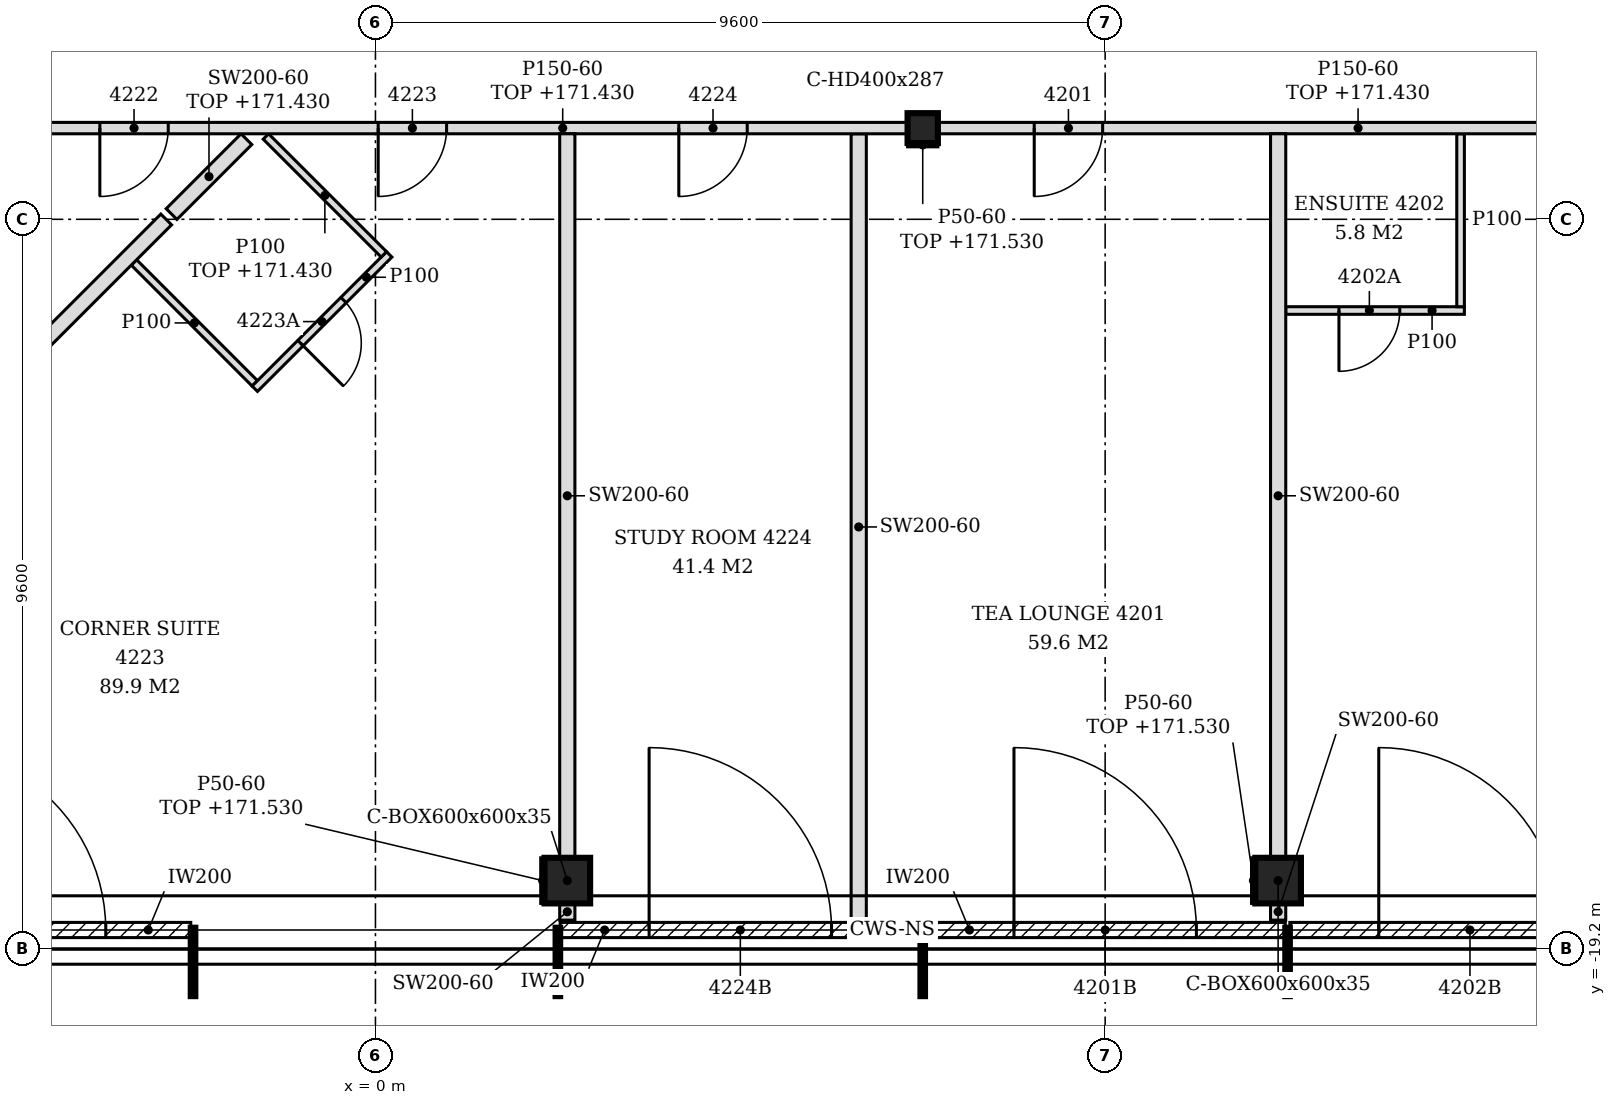
"""IFC4 building model, lengths in metres.
Left out: names, types, materials, properties, quantities, classifications, styles, units other than length and angle.
Written with IfcOpenShell. Run it as: python <this file> out.ifc"""

import sys

from ifc_helpers import new_model, si_unit, direction, frame, frame_2d, origin, origin_2d, place, context, subcontext, project, spatial, polyline, rectangle, hollow_rectangle, i_section, outline, extrude, clip, halfspace, element, fill, save


model = new_model("IFC4")
c1 = context("Model", 3, precision=1e-05, world=origin(), true_north=direction((0.0, 1.0)))
c2 = subcontext(c1, "Body", "Model", "MODEL_VIEW")
j1 = project(units=[si_unit("LENGTHUNIT", "METRE"), si_unit("PLANEANGLEUNIT", "RADIAN")], contexts=[c1])
p1 = place(None, origin())
s1 = spatial("IfcSite", under=j1, at=p1, CompositionType="ELEMENT")
p2 = place(p1, origin())
s2 = spatial("IfcBuilding", under=s1, at=p2, CompositionType="ELEMENT")
p3 = place(p2, frame((0.0, 0.0, 168.6)))
s3 = spatial("IfcBuildingStorey", under=s2, at=p3, CompositionType="ELEMENT", Elevation=168.6)
for number, where, z_axis, x_axis in (
    (1, (2.524, -18.3, -0.15), (0.0, 0.0, 1.0), (1.0, 0.0, 0.0)),
    (2, (11.876, -18.3, -0.15), (0.0, 0.0, 1.0), (1.0, 0.0, 0.0)),
):
    element("IfcColumn", number, at=place(p3, frame(where, z_axis=z_axis, x_axis=x_axis)), inside=s3, PredefinedType="COLUMN", context=c2, shape_type="Clipping", body=[
        clip(extrude(hollow_rectangle(XDim=0.6, YDim=0.6, WallThickness=0.035, at=origin_2d()), origin(), (0.0, 0.0, 1.0), 3.6), halfspace(frame((0.0, 0.0, 3.589), z_axis=(0.0, 0.0, 1.0), x_axis=(1.0, 0.0, 0.0)), False)),
    ])
p4 = place(p3, frame((7.2, -8.4, -0.15), z_axis=(0.0, 0.0, 1.0), x_axis=(1.0, 0.0, 0.0)))
e3 = element("IfcColumn", 3, at=p4, inside=s3, PredefinedType="COLUMN", context=c2, shape_type="SweptSolid", body=[
    extrude(i_section(OverallWidth=0.399, OverallDepth=0.393, WebThickness=0.023, FlangeThickness=0.037, FilletRadius=0.015, at=origin_2d()), origin(), (0.0, 0.0, 1.0), 3.6),
])
p5 = place(p3, frame((-7.056, -18.95, 0.0), z_axis=(0.0, 0.0, 1.0), x_axis=(1.0, 0.0, 0.0)))
e4 = element("IfcWall", 4, at=p5, inside=s3, PredefinedType="NOTDEFINED", context=c2, shape_type="SweptSolid", body=[
    extrude(rectangle(XDim=4.626, YDim=0.2, at=frame_2d((2.313, 0.0))), origin(), (0.0, 0.0, 1.0), 3.45),
])
p6 = place(p5, frame((1.108, 0.0, 0.0)))
e5 = element("IfcOpeningElement", 5, at=p6, cuts=e4, PredefinedType="OPENING", context=c2, shape_type="SweptSolid", body=[
    extrude(rectangle(XDim=2.4, YDim=2.4, at=frame_2d((1.2, 1.2))), frame((0.0, 0.11, 0.0), z_axis=(0.0, -1.0, 0.0), x_axis=(1.0, 0.0, 0.0)), (0.0, 0.0, 1.0), 0.22),
])
p7 = place(p3, frame((2.43, -18.95, 0.0), z_axis=(0.0, 0.0, 1.0), x_axis=(1.0, 0.0, 0.0)))
e6 = element("IfcWall", 6, at=p7, inside=s3, PredefinedType="NOTDEFINED", context=c2, shape_type="SweptSolid", body=[
    extrude(rectangle(XDim=4.74, YDim=0.2, at=frame_2d((2.37, 0.0))), origin(), (0.0, 0.0, 1.0), 3.45),
])
p8 = place(p7, frame((1.17, 0.0, 0.0)))
e7 = element("IfcOpeningElement", 7, at=p8, cuts=e6, PredefinedType="OPENING", context=c2, shape_type="SweptSolid", body=[
    extrude(rectangle(XDim=2.4, YDim=2.4, at=frame_2d((1.2, 1.2))), frame((0.0, 0.11, 0.0), z_axis=(0.0, -1.0, 0.0), x_axis=(1.0, 0.0, 0.0)), (0.0, 0.0, 1.0), 0.22),
])
p9 = place(p3, frame((7.23, -18.95, 0.0), z_axis=(0.0, 0.0, 1.0), x_axis=(1.0, 0.0, 0.0)))
e8 = element("IfcWall", 8, at=p9, inside=s3, PredefinedType="NOTDEFINED", context=c2, shape_type="SweptSolid", body=[
    extrude(rectangle(XDim=4.74, YDim=0.2, at=frame_2d((2.37, 0.0))), origin(), (0.0, 0.0, 1.0), 3.45),
])
p10 = place(p9, frame((1.17, 0.0, 0.0)))
e9 = element("IfcOpeningElement", 9, at=p10, cuts=e8, PredefinedType="OPENING", context=c2, shape_type="SweptSolid", body=[
    extrude(rectangle(XDim=2.4, YDim=2.4, at=frame_2d((1.2, 1.2))), frame((0.0, 0.11, 0.0), z_axis=(0.0, -1.0, 0.0), x_axis=(1.0, 0.0, 0.0)), (0.0, 0.0, 1.0), 0.22),
])
p11 = place(p3, frame((12.03, -18.95, 0.0), z_axis=(0.0, 0.0, 1.0), x_axis=(1.0, 0.0, 0.0)))
e10 = element("IfcWall", 10, at=p11, inside=s3, PredefinedType="NOTDEFINED", context=c2, shape_type="SweptSolid", body=[
    extrude(rectangle(XDim=4.74, YDim=0.2, at=frame_2d((2.37, 0.0))), origin(), (0.0, 0.0, 1.0), 3.45),
])
p12 = place(p11, frame((1.17, 0.0, 0.0)))
e11 = element("IfcOpeningElement", 11, at=p12, cuts=e10, PredefinedType="OPENING", context=c2, shape_type="SweptSolid", body=[
    extrude(rectangle(XDim=2.4, YDim=2.4, at=frame_2d((1.2, 1.2))), frame((0.0, 0.11, 0.0), z_axis=(0.0, -1.0, 0.0), x_axis=(1.0, 0.0, 0.0)), (0.0, 0.0, 1.0), 0.22),
])
p13 = place(p3, frame((2.524, -18.82, 0.0), z_axis=(0.0, 0.0, 1.0), x_axis=(0.0, 1.0, 0.0)))
e12 = element("IfcWall", 12, at=p13, inside=s3, PredefinedType="PARTITIONING", context=c2, shape_type="SweptSolid", body=[
    extrude(rectangle(XDim=0.22, YDim=0.2, at=frame_2d((0.11, 0.0))), origin(), (0.0, 0.0, 1.0), 3.45),
])
p14 = place(p3, frame((6.358, -18.82, 0.0), z_axis=(0.0, 0.0, 1.0), x_axis=(0.0, 1.0, 0.0)))
e13 = element("IfcWall", 13, at=p14, inside=s3, PredefinedType="PARTITIONING", context=c2, shape_type="SweptSolid", body=[
    extrude(outline(polyline([(0.0, 0.0), (10.345, 0.0), (10.345, 2.83), (10.27, 2.83), (10.268, 3.45), (4.525, 3.45), (4.523, 2.88), (4.315, 2.88), (4.313, 3.45), (0.67, 3.45), (0.668, 2.93), (0.37, 2.93), (0.368, 3.45), (0.0, 3.45), (0.0, 0.0)])), frame((0.0, 0.1, 0.0), z_axis=(0.0, -1.0, 0.0), x_axis=(1.0, 0.0, 0.0)), (0.0, 0.0, 1.0), 0.2),
])
p15 = place(p3, frame((11.876, -18.82, 0.0), z_axis=(0.0, 0.0, 1.0), x_axis=(0.0, 1.0, 0.0)))
e14 = element("IfcWall", 14, at=p15, inside=s3, PredefinedType="PARTITIONING", context=c2, shape_type="SweptSolid", body=[
    extrude(rectangle(XDim=0.22, YDim=0.2, at=frame_2d((0.11, 0.0))), origin(), (0.0, 0.0, 1.0), 3.45),
])
for number, where, z_axis, x_axis in (
    (15, (2.524, -18.0, 0.0), (0.0, 0.0, 1.0), (0.0, 1.0, 0.0)),
    (16, (11.876, -18.0, 0.0), (0.0, 0.0, 1.0), (0.0, 1.0, 0.0)),
):
    element("IfcWall", number, at=place(p3, frame(where, z_axis=z_axis, x_axis=x_axis)), inside=s3, PredefinedType="PARTITIONING", context=c2, shape_type="SweptSolid", body=[
        extrude(outline(polyline([(0.0, 0.0), (9.525, 0.0), (9.525, 2.83), (9.45, 2.83), (9.448, 3.45), (3.705, 3.45), (3.703, 2.88), (3.495, 2.88), (3.493, 3.45), (0.0, 3.45), (0.0, 0.0)])), frame((0.0, 0.1, 0.0), z_axis=(0.0, -1.0, 0.0), x_axis=(1.0, 0.0, 0.0)), (0.0, 0.0, 1.0), 0.2),
    ])
p16 = place(p3, frame((-9.507, -16.355, 0.0), z_axis=(0.0, 0.0, 1.0), x_axis=(0.707170680804, 0.707042875794, 0.0)))
e17 = element("IfcWall", 17, at=p16, inside=s3, PredefinedType="PARTITIONING", context=c2, shape_type="SweptSolid", body=[
    extrude(rectangle(XDim=9.551, YDim=0.2, at=frame_2d((4.776, 0.0))), origin(), (0.0, 0.0, 1.0), 2.93),
])
p17 = place(p3, frame((-1.587, -11.759, 0.0), z_axis=(0.0, 0.0, 1.0), x_axis=(-0.706889644159, 0.707323851557, 0.0)))
e18 = element("IfcWall", 18, at=p17, inside=s3, PredefinedType="PARTITIONING", context=c2, shape_type="SweptSolid", body=[
    extrude(rectangle(XDim=2.249, YDim=0.1, at=frame_2d((1.125, 0.0))), origin(), (0.0, 0.0, 1.0), 3.45),
])
p18 = place(p3, frame((-1.587, -11.829, 0.0), z_axis=(0.0, 0.0, 1.0), x_axis=(0.707350821469, 0.706862656651, 0.0)))
e19 = element("IfcWall", 19, at=p18, inside=s3, PredefinedType="PARTITIONING", context=c2, shape_type="SweptSolid", body=[
    extrude(rectangle(XDim=2.5, YDim=0.1, at=frame_2d((1.25, 0.0))), origin(), (0.0, 0.0, 1.0), 3.45),
])
p19 = place(p18, frame((0.85, 0.0, 0.0)))
e20 = element("IfcOpeningElement", 20, at=p19, cuts=e19, PredefinedType="OPENING", context=c2, shape_type="SweptSolid", body=[
    extrude(rectangle(XDim=0.8, YDim=2.1, at=frame_2d((0.4, 1.05))), frame((0.0, 0.06, 0.0), z_axis=(0.0, -1.0, 0.0), x_axis=(1.0, 0.0, 0.0)), (0.0, 0.0, 1.0), 0.12),
])
p20 = place(p3, frame((11.976, -10.8, 0.0), z_axis=(0.0, 0.0, 1.0), x_axis=(1.0, 0.0, 0.0)))
e21 = element("IfcWall", 21, at=p20, inside=s3, PredefinedType="PARTITIONING", context=c2, shape_type="SweptSolid", body=[
    extrude(rectangle(XDim=2.35, YDim=0.1, at=frame_2d((1.175, 0.0))), origin(), (0.0, 0.0, 1.0), 3.45),
])
p21 = place(p20, frame((0.7, 0.0, 0.0)))
e22 = element("IfcOpeningElement", 22, at=p21, cuts=e21, PredefinedType="OPENING", context=c2, shape_type="SweptSolid", body=[
    extrude(rectangle(XDim=0.8, YDim=2.1, at=frame_2d((0.4, 1.05))), frame((0.0, 0.06, 0.0), z_axis=(0.0, -1.0, 0.0), x_axis=(1.0, 0.0, 0.0)), (0.0, 0.0, 1.0), 0.12),
])
p22 = place(p3, frame((14.276, -10.75, 0.0), z_axis=(0.0, 0.0, 1.0), x_axis=(0.0, 1.0, 0.0)))
e23 = element("IfcWall", 23, at=p22, inside=s3, PredefinedType="PARTITIONING", context=c2, shape_type="SweptSolid", body=[
    extrude(outline(polyline([(0.0, 0.0), (2.275, 0.0), (2.275, 2.83), (2.2, 2.83), (2.198, 3.45), (0.0, 3.45), (0.0, 0.0)])), frame((0.0, 0.05, 0.0), z_axis=(0.0, -1.0, 0.0), x_axis=(1.0, 0.0, 0.0)), (0.0, 0.0, 1.0), 0.1),
])
p23 = place(p3, frame((0.111, -10.062, 0.0), z_axis=(0.0, 0.0, 1.0), x_axis=(-0.70732924673, 0.706884245631, 0.0)))
e24 = element("IfcWall", 24, at=p23, inside=s3, PredefinedType="PARTITIONING", context=c2, shape_type="SweptSolid", body=[
    extrude(rectangle(XDim=2.195, YDim=0.1, at=frame_2d((1.097, 0.0))), origin(), (0.0, 0.0, 1.0), 2.83),
])
p24 = place(p3, frame((-2.683, -9.531, 0.0), z_axis=(0.0, 0.0, 1.0), x_axis=(0.707019164958, 0.70719438656, 0.0)))
e25 = element("IfcWall", 25, at=p24, inside=s3, PredefinedType="PARTITIONING", context=c2, shape_type="SweptSolid", body=[
    extrude(rectangle(XDim=1.393, YDim=0.2, at=frame_2d((0.697, 0.0))), origin(), (0.0, 0.0, 1.0), 2.83),
])
p25 = place(p3, frame((-4.601, -8.4, 0.0), z_axis=(0.0, 0.0, 1.0), x_axis=(1.0, 0.0, 0.0)))
e26 = element("IfcWall", 26, at=p25, inside=s3, PredefinedType="PARTITIONING", context=c2, shape_type="SweptSolid", body=[
    extrude(rectangle(XDim=11.601, YDim=0.15, at=frame_2d((5.801, 0.0))), origin(), (0.0, 0.0, 1.0), 2.83),
])
p26 = place(p25, frame((0.974, 0.0, 0.0)))
e27 = element("IfcOpeningElement", 27, at=p26, cuts=e26, PredefinedType="OPENING", context=c2, shape_type="SweptSolid", body=[
    extrude(rectangle(XDim=0.9, YDim=2.1, at=frame_2d((0.45, 1.05))), frame((0.0, 0.085, 0.0), z_axis=(0.0, -1.0, 0.0), x_axis=(1.0, 0.0, 0.0)), (0.0, 0.0, 1.0), 0.17),
])
p27 = place(p25, frame((4.636, 0.0, 0.0)))
e28 = element("IfcOpeningElement", 28, at=p27, cuts=e26, PredefinedType="OPENING", context=c2, shape_type="SweptSolid", body=[
    extrude(rectangle(XDim=0.9, YDim=2.1, at=frame_2d((0.45, 1.05))), frame((0.0, 0.085, 0.0), z_axis=(0.0, -1.0, 0.0), x_axis=(1.0, 0.0, 0.0)), (0.0, 0.0, 1.0), 0.17),
])
p28 = place(p25, frame((8.592, 0.0, 0.0)))
e29 = element("IfcOpeningElement", 29, at=p28, cuts=e26, PredefinedType="OPENING", context=c2, shape_type="SweptSolid", body=[
    extrude(rectangle(XDim=0.9, YDim=2.1, at=frame_2d((0.45, 1.05))), frame((0.0, 0.085, 0.0), z_axis=(0.0, -1.0, 0.0), x_axis=(1.0, 0.0, 0.0)), (0.0, 0.0, 1.0), 0.17),
])
p29 = place(p3, frame((7.399, -8.4, 0.0), z_axis=(0.0, 0.0, 1.0), x_axis=(1.0, 0.0, 0.0)))
e30 = element("IfcWall", 30, at=p29, inside=s3, PredefinedType="PARTITIONING", context=c2, shape_type="SweptSolid", body=[
    extrude(rectangle(XDim=11.601, YDim=0.15, at=frame_2d((5.801, 0.0))), origin(), (0.0, 0.0, 1.0), 2.83),
])
p30 = place(p29, frame((1.268, 0.0, 0.0)))
e31 = element("IfcOpeningElement", 31, at=p30, cuts=e30, PredefinedType="OPENING", context=c2, shape_type="SweptSolid", body=[
    extrude(rectangle(XDim=0.9, YDim=2.1, at=frame_2d((0.45, 1.05))), frame((0.0, 0.085, 0.0), z_axis=(0.0, -1.0, 0.0), x_axis=(1.0, 0.0, 0.0)), (0.0, 0.0, 1.0), 0.17),
])
p31 = place(p29, frame((8.888, 0.0, 0.0)))
e32 = element("IfcOpeningElement", 32, at=p31, cuts=e30, PredefinedType="OPENING", context=c2, shape_type="SweptSolid", body=[
    extrude(rectangle(XDim=0.9, YDim=2.1, at=frame_2d((0.45, 1.05))), frame((0.0, 0.085, 0.0), z_axis=(0.0, -1.0, 0.0), x_axis=(1.0, 0.0, 0.0)), (0.0, 0.0, 1.0), 0.17),
])
for number, where, z_axis, x_axis in (
    (33, (2.199, -18.6, 0.0), (0.0, 0.0, 1.0), (0.0, 1.0, 0.0)),
    (34, (11.551, -18.6, 0.0), (0.0, 0.0, 1.0), (0.0, 1.0, 0.0)),
):
    element("IfcWall", number, at=place(p3, frame(where, z_axis=z_axis, x_axis=x_axis)), inside=s3, PredefinedType="PARTITIONING", context=c2, shape_type="SweptSolid", body=[
        extrude(rectangle(XDim=0.6, YDim=0.05, at=frame_2d((0.3, 0.0))), origin(), (0.0, 0.0, 1.0), 2.93),
    ])
p32 = place(p3, frame((7.0, -8.622, 0.0), z_axis=(0.0, 0.0, 1.0), x_axis=(1.0, 0.0, 0.0)))
e35 = element("IfcWall", 35, at=p32, inside=s3, PredefinedType="PARTITIONING", context=c2, shape_type="SweptSolid", body=[
    extrude(rectangle(XDim=0.399, YDim=0.05, at=frame_2d((0.199, 0.0))), origin(), (0.0, 0.0, 1.0), 2.93),
])
p33 = place(p6, origin())
e36 = element("IfcDoor", 36, at=p33, inside=s3, OperationType="SINGLE_SWING_LEFT", PredefinedType="DOOR", context=c2, shape_type="SweptSolid", body=[
    extrude(rectangle(XDim=2.4, YDim=2.4, at=frame_2d((1.2, 1.2))), frame((0.0, 0.025, 0.0), z_axis=(0.0, -1.0, 0.0), x_axis=(1.0, 0.0, 0.0)), (0.0, 0.0, 1.0), 0.05),
])
fill(e5, e36)
p34 = place(p8, origin())
e37 = element("IfcDoor", 37, at=p34, inside=s3, OperationType="SINGLE_SWING_LEFT", PredefinedType="DOOR", context=c2, shape_type="SweptSolid", body=[
    extrude(rectangle(XDim=2.4, YDim=2.4, at=frame_2d((1.2, 1.2))), frame((0.0, 0.025, 0.0), z_axis=(0.0, -1.0, 0.0), x_axis=(1.0, 0.0, 0.0)), (0.0, 0.0, 1.0), 0.05),
])
fill(e7, e37)
p35 = place(p10, origin())
e38 = element("IfcDoor", 38, at=p35, inside=s3, OperationType="SINGLE_SWING_LEFT", PredefinedType="DOOR", context=c2, shape_type="SweptSolid", body=[
    extrude(rectangle(XDim=2.4, YDim=2.4, at=frame_2d((1.2, 1.2))), frame((0.0, 0.025, 0.0), z_axis=(0.0, -1.0, 0.0), x_axis=(1.0, 0.0, 0.0)), (0.0, 0.0, 1.0), 0.05),
])
fill(e9, e38)
p36 = place(p12, origin())
e39 = element("IfcDoor", 39, at=p36, inside=s3, OperationType="SINGLE_SWING_LEFT", PredefinedType="DOOR", context=c2, shape_type="SweptSolid", body=[
    extrude(rectangle(XDim=2.4, YDim=2.4, at=frame_2d((1.2, 1.2))), frame((0.0, 0.025, 0.0), z_axis=(0.0, -1.0, 0.0), x_axis=(1.0, 0.0, 0.0)), (0.0, 0.0, 1.0), 0.05),
])
fill(e11, e39)
p37 = place(p30, frame((0.9, 0.0, 0.0), z_axis=(0.0, 0.0, 1.0), x_axis=(-1.0, 0.0, 0.0)))
e40 = element("IfcDoor", 40, at=p37, inside=s3, OperationType="SINGLE_SWING_RIGHT", PredefinedType="DOOR", context=c2, shape_type="SweptSolid", body=[
    extrude(rectangle(XDim=0.9, YDim=2.1, at=frame_2d((0.45, 1.05))), frame((0.0, 0.025, 0.0), z_axis=(0.0, -1.0, 0.0), x_axis=(1.0, 0.0, 0.0)), (0.0, 0.0, 1.0), 0.05),
])
fill(e31, e40)
p38 = place(p21, frame((0.8, 0.0, 0.0), z_axis=(0.0, 0.0, 1.0), x_axis=(-1.0, 0.0, 0.0)))
e41 = element("IfcDoor", 41, at=p38, inside=s3, OperationType="SINGLE_SWING_RIGHT", PredefinedType="DOOR", context=c2, shape_type="SweptSolid", body=[
    extrude(rectangle(XDim=0.8, YDim=2.1, at=frame_2d((0.4, 1.05))), frame((0.0, 0.025, 0.0), z_axis=(0.0, -1.0, 0.0), x_axis=(1.0, 0.0, 0.0)), (0.0, 0.0, 1.0), 0.05),
])
fill(e22, e41)
p39 = place(p26, frame((0.9, 0.0, 0.0), z_axis=(0.0, 0.0, 1.0), x_axis=(-1.0, 0.0, 0.0)))
e42 = element("IfcDoor", 42, at=p39, inside=s3, OperationType="SINGLE_SWING_RIGHT", PredefinedType="DOOR", context=c2, shape_type="SweptSolid", body=[
    extrude(rectangle(XDim=0.9, YDim=2.1, at=frame_2d((0.45, 1.05))), frame((0.0, 0.025, 0.0), z_axis=(0.0, -1.0, 0.0), x_axis=(1.0, 0.0, 0.0)), (0.0, 0.0, 1.0), 0.05),
])
fill(e27, e42)
p40 = place(p27, frame((0.9, 0.0, 0.0), z_axis=(0.0, 0.0, 1.0), x_axis=(-1.0, 0.0, 0.0)))
e43 = element("IfcDoor", 43, at=p40, inside=s3, OperationType="SINGLE_SWING_RIGHT", PredefinedType="DOOR", context=c2, shape_type="SweptSolid", body=[
    extrude(rectangle(XDim=0.9, YDim=2.1, at=frame_2d((0.45, 1.05))), frame((0.0, 0.025, 0.0), z_axis=(0.0, -1.0, 0.0), x_axis=(1.0, 0.0, 0.0)), (0.0, 0.0, 1.0), 0.05),
])
fill(e28, e43)
p41 = place(p19, frame((0.8, 0.0, 0.0), z_axis=(0.0, 0.0, 1.0), x_axis=(-1.0, 0.0, 0.0)))
e44 = element("IfcDoor", 44, at=p41, inside=s3, OperationType="SINGLE_SWING_RIGHT", PredefinedType="DOOR", context=c2, shape_type="SweptSolid", body=[
    extrude(rectangle(XDim=0.8, YDim=2.1, at=frame_2d((0.4, 1.05))), frame((0.0, 0.025, 0.0), z_axis=(0.0, -1.0, 0.0), x_axis=(1.0, 0.0, 0.0)), (0.0, 0.0, 1.0), 0.05),
])
fill(e20, e44)
p42 = place(p28, frame((0.9, 0.0, 0.0), z_axis=(0.0, 0.0, 1.0), x_axis=(-1.0, 0.0, 0.0)))
e45 = element("IfcDoor", 45, at=p42, inside=s3, OperationType="SINGLE_SWING_RIGHT", PredefinedType="DOOR", context=c2, shape_type="SweptSolid", body=[
    extrude(rectangle(XDim=0.9, YDim=2.1, at=frame_2d((0.45, 1.05))), frame((0.0, 0.025, 0.0), z_axis=(0.0, -1.0, 0.0), x_axis=(1.0, 0.0, 0.0)), (0.0, 0.0, 1.0), 0.05),
])
fill(e29, e45)
save(model, sys.argv[1])
